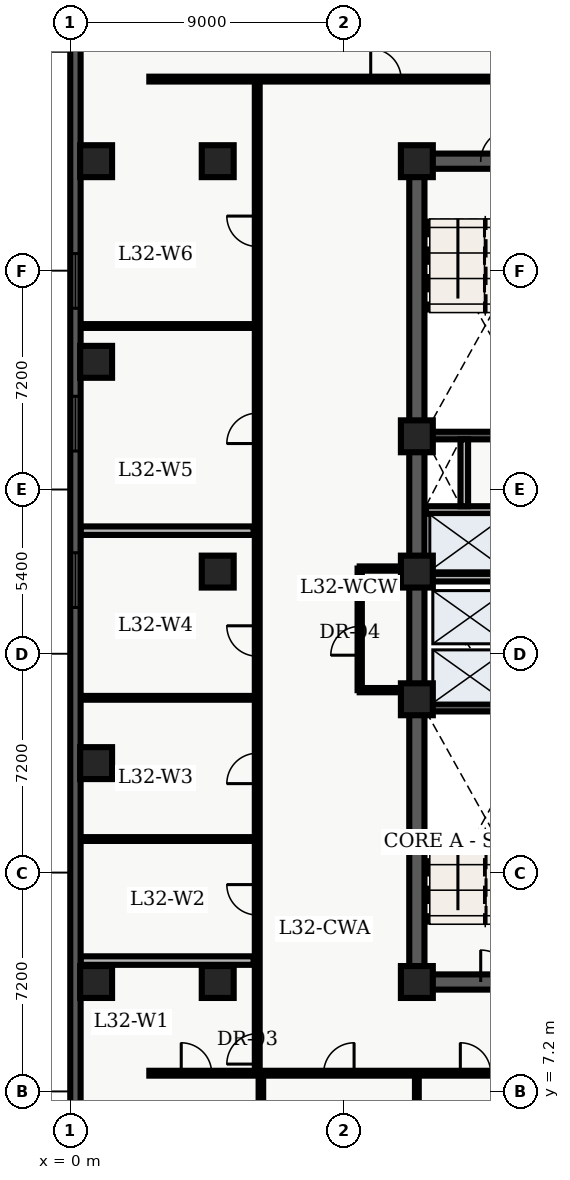
"""IFC4 building model, lengths in metres.
Left out: names, types, materials, properties, quantities, classifications, styles, units other than length and angle.
Written with IfcOpenShell. Run it as: python <this file> out.ifc"""

import sys

from ifc_helpers import new_model, entity, si_unit, converted_unit, direction, frame, origin_with_axes, origin_2d_with_axis, place, context, subcontext, project, spatial, polyline, rectangle, outline, extrude, element, fill, save


model = new_model("IFC4")
c1 = context("Model", 3, precision=1e-05, world=origin_with_axes(), true_north=direction((0.0, 1.0)))
c2 = subcontext(c1, "Body", "Model", "MODEL_VIEW")
j1 = project(units=[si_unit("LENGTHUNIT", "METRE"), converted_unit("PLANEANGLEUNIT", "DEGREE", entity("IfcPlaneAngleMeasure", 0.017), si_unit("PLANEANGLEUNIT", "RADIAN"), dimensions=[0, 0, 0, 0, 0, 0, 0])], contexts=[c1])
p1 = place(None, origin_with_axes())
s1 = spatial("IfcSite", under=j1, at=p1, CompositionType="ELEMENT")
p2 = place(p1, origin_with_axes())
s2 = spatial("IfcBuilding", under=s1, at=p2, CompositionType="ELEMENT")
p3 = place(p2, frame((0.0, 0.0, 132.9), z_axis=(0.0, 0.0, 1.0), x_axis=(1.0, 0.0, 0.0)))
s3 = spatial("IfcBuildingStorey", under=s2, at=p3, CompositionType="ELEMENT", Elevation=132.9)
p4 = place(p3, frame((11.4, 10.8, 0.0), z_axis=(0.0, 0.0, 1.0), x_axis=(0.0, 1.0, 0.0)))
e1 = element("IfcWall", 1, at=p4, inside=s3, PredefinedType="SHEAR", context=c2, shape_type="SweptSolid", body=[
    extrude(outline(polyline([(0.0, -0.25), (27.0, -0.25), (27.0, 0.25), (0.0, 0.25), (0.0, -0.25)])), origin_with_axes(), (0.0, 0.0, 1.0), 3.66),
])
p5 = place(p3, frame((11.4, 10.8, 0.0), z_axis=(0.0, 0.0, 1.0), x_axis=(1.0, 0.0, 0.0)))
e2 = element("IfcWall", 2, at=p5, inside=s3, PredefinedType="SHEAR", context=c2, shape_type="SweptSolid", body=[
    extrude(outline(polyline([(0.0, -0.25), (7.2, -0.25), (7.2, 0.25), (0.0, 0.25), (0.0, -0.25)])), origin_with_axes(), (0.0, 0.0, 1.0), 3.66),
])
p6 = place(p5, frame((2.625, 0.0, 0.0), z_axis=(0.0, 0.0, 1.0), x_axis=(1.0, 0.0, 0.0)))
e3 = element("IfcOpeningElement", 3, at=p6, cuts=e2, PredefinedType="OPENING", context=c2, shape_type="SweptSolid", body=[
    extrude(rectangle(XDim=1.05, YDim=0.52, at=origin_2d_with_axis()), origin_with_axes(), (0.0, 0.0, 1.0), 2.15),
])
p7 = place(p3, frame((11.4, 37.8, 0.0), z_axis=(0.0, 0.0, 1.0), x_axis=(1.0, 0.0, 0.0)))
e4 = element("IfcWall", 4, at=p7, inside=s3, PredefinedType="SHEAR", context=c2, shape_type="SweptSolid", body=[
    extrude(outline(polyline([(0.0, -0.25), (7.2, -0.25), (7.2, 0.25), (0.0, 0.25), (0.0, -0.25)])), origin_with_axes(), (0.0, 0.0, 1.0), 3.66),
])
p8 = place(p7, frame((2.625, 0.0, 0.0), z_axis=(0.0, 0.0, 1.0), x_axis=(1.0, 0.0, 0.0)))
e5 = element("IfcOpeningElement", 5, at=p8, cuts=e4, PredefinedType="OPENING", context=c2, shape_type="SweptSolid", body=[
    extrude(rectangle(XDim=1.05, YDim=0.52, at=origin_2d_with_axis()), origin_with_axes(), (0.0, 0.0, 1.0), 2.15),
])
for number, where, z_axis, x_axis in (
    (6, (11.65, 19.825, 0.0), (0.0, 0.0, 1.0), (1.0, 0.0, 0.0)),
    (7, (11.65, 28.775, 0.0), (0.0, 0.0, 1.0), (1.0, 0.0, 0.0)),
):
    element("IfcWall", number, at=place(p3, frame(where, z_axis=z_axis, x_axis=x_axis)), inside=s3, PredefinedType="SHEAR", context=c2, shape_type="SweptSolid", body=[
        extrude(outline(polyline([(0.0, -0.125), (6.7, -0.125), (6.7, 0.125), (0.0, 0.125), (0.0, -0.125)])), origin_with_axes(), (0.0, 0.0, 1.0), 3.66),
    ])
p9 = place(p3, frame((11.7, 24.1, 0.0), z_axis=(0.0, 0.0, 1.0), x_axis=(1.0, 0.0, 0.0)))
e8 = element("IfcWall", 8, at=p9, inside=s3, PredefinedType="SOLIDWALL", context=c2, shape_type="SweptSolid", body=[
    extrude(outline(polyline([(0.0, -0.125), (6.6, -0.125), (6.6, 0.125), (0.0, 0.125), (0.0, -0.125)])), origin_with_axes(), (0.0, 0.0, 1.0), 2.7),
])
p10 = place(p9, frame((3.75, 0.0, 0.0), z_axis=(0.0, 0.0, 1.0), x_axis=(1.0, 0.0, 0.0)))
e9 = element("IfcOpeningElement", 9, at=p10, cuts=e8, PredefinedType="OPENING", context=c2, shape_type="SweptSolid", body=[
    extrude(rectangle(XDim=0.9, YDim=0.27, at=origin_2d_with_axis()), origin_with_axes(), (0.0, 0.0, 1.0), 2.15),
])
p11 = place(p3, frame((11.7, 26.325, 0.0), z_axis=(0.0, 0.0, 1.0), x_axis=(1.0, 0.0, 0.0)))
e10 = element("IfcWall", 10, at=p11, inside=s3, PredefinedType="SOLIDWALL", context=c2, shape_type="SweptSolid", body=[
    extrude(outline(polyline([(0.0, -0.125), (6.6, -0.125), (6.6, 0.125), (0.0, 0.125), (0.0, -0.125)])), origin_with_axes(), (0.0, 0.0, 1.0), 2.7),
])
p12 = place(p11, frame((3.5, 0.0, 0.0), z_axis=(0.0, 0.0, 1.0), x_axis=(1.0, 0.0, 0.0)))
e11 = element("IfcOpeningElement", 11, at=p12, cuts=e10, PredefinedType="OPENING", context=c2, shape_type="SweptSolid", body=[
    extrude(rectangle(XDim=0.9, YDim=0.27, at=origin_2d_with_axis()), origin_with_axes(), (0.0, 0.0, 1.0), 2.15),
])
p13 = place(p3, frame((12.96, 26.45, 0.0), z_axis=(0.0, 0.0, 1.0), x_axis=(0.0, 1.0, 0.0)))
e12 = element("IfcWall", 12, at=p13, inside=s3, PredefinedType="SOLIDWALL", context=c2, shape_type="SweptSolid", body=[
    extrude(outline(polyline([(0.0, -0.125), (2.2, -0.125), (2.2, 0.125), (0.0, 0.125), (0.0, -0.125)])), origin_with_axes(), (0.0, 0.0, 1.0), 2.7),
])
for number, where, z_axis, x_axis in (
    (13, (11.4, 10.8, 0.0), (0.0, 0.0, 1.0), (1.0, 0.0, 0.0)),
    (14, (11.4, 20.1, 0.0), (0.0, 0.0, 1.0), (1.0, 0.0, 0.0)),
    (15, (11.4, 24.3, 0.0), (0.0, 0.0, 1.0), (1.0, 0.0, 0.0)),
    (16, (11.4, 28.75, 0.0), (0.0, 0.0, 1.0), (1.0, 0.0, 0.0)),
    (17, (11.4, 37.8, 0.0), (0.0, 0.0, 1.0), (1.0, 0.0, 0.0)),
    (18, (4.85, 10.8, 0.0), (0.0, 0.0, 1.0), (1.0, 0.0, 0.0)),
    (19, (4.85, 24.3, 0.0), (0.0, 0.0, 1.0), (1.0, 0.0, 0.0)),
    (20, (4.85, 37.8, 0.0), (0.0, 0.0, 1.0), (1.0, 0.0, 0.0)),
    (21, (0.85, 10.8, 0.0), (0.0, 0.0, 1.0), (1.0, 0.0, 0.0)),
    (22, (0.85, 18.0, 0.0), (0.0, 0.0, 1.0), (1.0, 0.0, 0.0)),
    (23, (0.85, 31.2, 0.0), (0.0, 0.0, 1.0), (1.0, 0.0, 0.0)),
    (24, (0.85, 37.8, 0.0), (0.0, 0.0, 1.0), (1.0, 0.0, 0.0)),
):
    element("IfcColumn", number, at=place(p3, frame(where, z_axis=z_axis, x_axis=x_axis)), inside=s3, PredefinedType="COLUMN", context=c2, shape_type="SweptSolid", body=[
        extrude(rectangle(XDim=1.05, YDim=1.05, at=origin_2d_with_axis()), origin_with_axes(), (0.0, 0.0, 1.0), 3.9),
    ])
p14 = place(p3, frame((9.52, 20.4, 0.0), z_axis=(0.0, 0.0, 1.0), x_axis=(0.0, 1.0, 0.0)))
e25 = element("IfcWall", 25, at=p14, inside=s3, PredefinedType="PARTITIONING", context=c2, shape_type="SweptSolid", body=[
    extrude(outline(polyline([(0.0, -0.07), (4.0, -0.07), (4.0, 0.07), (0.0, 0.07), (0.0, -0.07)])), origin_with_axes(), (0.0, 0.0, 1.0), 2.7),
])
p15 = place(p14, frame((1.625, 0.0, 0.0), z_axis=(0.0, 0.0, 1.0), x_axis=(1.0, 0.0, 0.0)))
e26 = element("IfcOpeningElement", 26, at=p15, cuts=e25, PredefinedType="OPENING", context=c2, shape_type="SweptSolid", body=[
    extrude(rectangle(XDim=0.95, YDim=0.16, at=origin_2d_with_axis()), origin_with_axes(), (0.0, 0.0, 1.0), 2.15),
])
for number, where, z_axis, x_axis in (
    (27, (9.52, 20.4, 0.0), (0.0, 0.0, 1.0), (1.0, 0.0, 0.0)),
    (28, (9.52, 24.4, 0.0), (0.0, 0.0, 1.0), (1.0, 0.0, 0.0)),
):
    element("IfcWall", number, at=place(p3, frame(where, z_axis=z_axis, x_axis=x_axis)), inside=s3, PredefinedType="PARTITIONING", context=c2, shape_type="SweptSolid", body=[
        extrude(outline(polyline([(0.0, -0.07), (1.58, -0.07), (1.58, 0.07), (0.0, 0.07), (0.0, -0.07)])), origin_with_axes(), (0.0, 0.0, 1.0), 2.7),
    ])
p16 = place(p3, frame((2.6, 7.8, 0.0), z_axis=(0.0, 0.0, 1.0), x_axis=(1.0, 0.0, 0.0)))
e29 = element("IfcWall", 29, at=p16, inside=s3, PredefinedType="PARTITIONING", context=c2, shape_type="SweptSolid", body=[
    extrude(outline(polyline([(0.0, -0.08), (18.55, -0.08), (18.55, 0.08), (0.0, 0.08), (0.0, -0.08)])), origin_with_axes(), (0.0, 0.0, 1.0), 2.7),
])
p17 = place(p16, frame((1.55, 0.0, 0.0), z_axis=(0.0, 0.0, 1.0), x_axis=(1.0, 0.0, 0.0)))
e30 = element("IfcOpeningElement", 30, at=p17, cuts=e29, PredefinedType="OPENING", context=c2, shape_type="SweptSolid", body=[
    extrude(rectangle(XDim=1.0, YDim=0.18, at=origin_2d_with_axis()), origin_with_axes(), (0.0, 0.0, 1.0), 2.15),
])
p18 = place(p16, frame((6.235, 0.0, 0.0), z_axis=(0.0, 0.0, 1.0), x_axis=(1.0, 0.0, 0.0)))
e31 = element("IfcOpeningElement", 31, at=p18, cuts=e29, PredefinedType="OPENING", context=c2, shape_type="SweptSolid", body=[
    extrude(rectangle(XDim=1.0, YDim=0.18, at=origin_2d_with_axis()), origin_with_axes(), (0.0, 0.0, 1.0), 2.15),
])
p19 = place(p16, frame((10.73, 0.0, 0.0), z_axis=(0.0, 0.0, 1.0), x_axis=(1.0, 0.0, 0.0)))
e32 = element("IfcOpeningElement", 32, at=p19, cuts=e29, PredefinedType="OPENING", context=c2, shape_type="SweptSolid", body=[
    extrude(rectangle(XDim=1.0, YDim=0.18, at=origin_2d_with_axis()), origin_with_axes(), (0.0, 0.0, 1.0), 2.15),
])
p20 = place(p16, frame((15.58, 0.0, 0.0), z_axis=(0.0, 0.0, 1.0), x_axis=(1.0, 0.0, 0.0)))
e33 = element("IfcOpeningElement", 33, at=p20, cuts=e29, PredefinedType="OPENING", context=c2, shape_type="SweptSolid", body=[
    extrude(rectangle(XDim=1.0, YDim=0.18, at=origin_2d_with_axis()), origin_with_axes(), (0.0, 0.0, 1.0), 2.15),
])
p21 = place(p3, frame((2.6, 40.5, 0.0), z_axis=(0.0, 0.0, 1.0), x_axis=(1.0, 0.0, 0.0)))
e34 = element("IfcWall", 34, at=p21, inside=s3, PredefinedType="PARTITIONING", context=c2, shape_type="SweptSolid", body=[
    extrude(outline(polyline([(0.0, -0.08), (18.769, -0.08), (18.769, 0.08), (0.0, 0.08), (0.0, -0.08)])), origin_with_axes(), (0.0, 0.0, 1.0), 2.7),
])
p22 = place(p21, frame((7.782, 0.0, 0.0), z_axis=(0.0, 0.0, 1.0), x_axis=(1.0, 0.0, 0.0)))
e35 = element("IfcOpeningElement", 35, at=p22, cuts=e34, PredefinedType="OPENING", context=c2, shape_type="SweptSolid", body=[
    extrude(rectangle(XDim=1.0, YDim=0.18, at=origin_2d_with_axis()), origin_with_axes(), (0.0, 0.0, 1.0), 2.15),
])
p23 = place(p3, frame((6.15, 7.8, 0.0), z_axis=(0.0, 0.0, 1.0), x_axis=(0.0, 1.0, 0.0)))
e36 = element("IfcWall", 36, at=p23, inside=s3, PredefinedType="PARTITIONING", context=c2, shape_type="SweptSolid", body=[
    extrude(outline(polyline([(0.0, -0.08), (32.7, -0.08), (32.7, 0.08), (0.0, 0.08), (0.0, -0.08)])), origin_with_axes(), (0.0, 0.0, 1.0), 2.7),
])
p24 = place(p23, frame((0.8, 0.0, 0.0), z_axis=(0.0, 0.0, 1.0), x_axis=(1.0, 0.0, 0.0)))
e37 = element("IfcOpeningElement", 37, at=p24, cuts=e36, PredefinedType="OPENING", context=c2, shape_type="SweptSolid", body=[
    extrude(rectangle(XDim=1.0, YDim=0.18, at=origin_2d_with_axis()), origin_with_axes(), (0.0, 0.0, 1.0), 2.15),
])
p25 = place(p23, frame((5.704, 0.0, 0.0), z_axis=(0.0, 0.0, 1.0), x_axis=(1.0, 0.0, 0.0)))
e38 = element("IfcOpeningElement", 38, at=p25, cuts=e36, PredefinedType="OPENING", context=c2, shape_type="SweptSolid", body=[
    extrude(rectangle(XDim=1.0, YDim=0.18, at=origin_2d_with_axis()), origin_with_axes(), (0.0, 0.0, 1.0), 2.15),
])
p26 = place(p23, frame((10.025, 0.0, 0.0), z_axis=(0.0, 0.0, 1.0), x_axis=(1.0, 0.0, 0.0)))
e39 = element("IfcOpeningElement", 39, at=p26, cuts=e36, PredefinedType="OPENING", context=c2, shape_type="SweptSolid", body=[
    extrude(rectangle(XDim=1.0, YDim=0.18, at=origin_2d_with_axis()), origin_with_axes(), (0.0, 0.0, 1.0), 2.15),
])
p27 = place(p23, frame((14.217, 0.0, 0.0), z_axis=(0.0, 0.0, 1.0), x_axis=(1.0, 0.0, 0.0)))
e40 = element("IfcOpeningElement", 40, at=p27, cuts=e36, PredefinedType="OPENING", context=c2, shape_type="SweptSolid", body=[
    extrude(rectangle(XDim=1.0, YDim=0.18, at=origin_2d_with_axis()), origin_with_axes(), (0.0, 0.0, 1.0), 2.15),
])
p28 = place(p23, frame((21.212, 0.0, 0.0), z_axis=(0.0, 0.0, 1.0), x_axis=(1.0, 0.0, 0.0)))
e41 = element("IfcOpeningElement", 41, at=p28, cuts=e36, PredefinedType="OPENING", context=c2, shape_type="SweptSolid", body=[
    extrude(rectangle(XDim=1.0, YDim=0.18, at=origin_2d_with_axis()), origin_with_axes(), (0.0, 0.0, 1.0), 2.15),
])
p29 = place(p23, frame((27.694, 0.0, 0.0), z_axis=(0.0, 0.0, 1.0), x_axis=(1.0, 0.0, 0.0)))
e42 = element("IfcOpeningElement", 42, at=p29, cuts=e36, PredefinedType="OPENING", context=c2, shape_type="SweptSolid", body=[
    extrude(rectangle(XDim=1.0, YDim=0.18, at=origin_2d_with_axis()), origin_with_axes(), (0.0, 0.0, 1.0), 2.15),
])
p30 = place(p3, frame((0.335, 11.505, 0.0), z_axis=(0.0, 0.0, 1.0), x_axis=(1.0, 0.0, 0.0)))
e43 = element("IfcWall", 43, at=p30, inside=s3, PredefinedType="PARTITIONING", context=c2, shape_type="SweptSolid", body=[
    extrude(outline(polyline([(0.0, -0.14), (5.695, -0.14), (5.695, 0.14), (0.0, 0.14), (0.0, -0.14)])), origin_with_axes(), (0.0, 0.0, 1.0), 2.7),
])
for number, where, z_axis, x_axis in (
    (44, (0.335, 15.503, 0.0), (0.0, 0.0, 1.0), (1.0, 0.0, 0.0)),
    (45, (0.335, 20.148, 0.0), (0.0, 0.0, 1.0), (1.0, 0.0, 0.0)),
):
    element("IfcWall", number, at=place(p3, frame(where, z_axis=z_axis, x_axis=x_axis)), inside=s3, PredefinedType="PARTITIONING", context=c2, shape_type="SweptSolid", body=[
        extrude(outline(polyline([(0.0, -0.062), (5.695, -0.062), (5.695, 0.062), (0.0, 0.062), (0.0, -0.062)])), origin_with_axes(), (0.0, 0.0, 1.0), 2.7),
    ])
p31 = place(p3, frame((0.335, 25.646, 0.0), z_axis=(0.0, 0.0, 1.0), x_axis=(1.0, 0.0, 0.0)))
e46 = element("IfcWall", 46, at=p31, inside=s3, PredefinedType="PARTITIONING", context=c2, shape_type="SweptSolid", body=[
    extrude(outline(polyline([(0.0, -0.14), (5.695, -0.14), (5.695, 0.14), (0.0, 0.14), (0.0, -0.14)])), origin_with_axes(), (0.0, 0.0, 1.0), 2.7),
])
p32 = place(p3, frame((0.335, 32.378, 0.0), z_axis=(0.0, 0.0, 1.0), x_axis=(1.0, 0.0, 0.0)))
e47 = element("IfcWall", 47, at=p32, inside=s3, PredefinedType="PARTITIONING", context=c2, shape_type="SweptSolid", body=[
    extrude(outline(polyline([(0.0, -0.062), (5.695, -0.062), (5.695, 0.062), (0.0, 0.062), (0.0, -0.062)])), origin_with_axes(), (0.0, 0.0, 1.0), 2.7),
])
p33 = place(p3, frame((6.27, 0.335, 0.0), z_axis=(0.0, 0.0, 1.0), x_axis=(0.0, 1.0, 0.0)))
e48 = element("IfcWall", 48, at=p33, inside=s3, PredefinedType="PARTITIONING", context=c2, shape_type="SweptSolid", body=[
    extrude(outline(polyline([(0.0, -0.075), (7.365, -0.075), (7.365, 0.075), (0.0, 0.075), (0.0, -0.075)])), origin_with_axes(), (0.0, 0.0, 1.0), 2.7),
])
p34 = place(p3, frame((11.4, 0.335, 0.0), z_axis=(0.0, 0.0, 1.0), x_axis=(0.0, 1.0, 0.0)))
e49 = element("IfcWall", 49, at=p34, inside=s3, PredefinedType="PARTITIONING", context=c2, shape_type="SweptSolid", body=[
    extrude(outline(polyline([(0.0, -0.062), (7.365, -0.062), (7.365, 0.062), (0.0, 0.062), (0.0, -0.062)])), origin_with_axes(), (0.0, 0.0, 1.0), 2.7),
])
p35 = place(p3, frame((0.17, 2.74, 0.0), z_axis=(0.0, 0.0, 1.0), x_axis=(0.0, 1.0, 0.0)))
e50 = element("IfcWall", 50, at=p35, inside=s3, PredefinedType="SOLIDWALL", context=c2, shape_type="SweptSolid", body=[
    extrude(outline(polyline([(0.0, -0.17), (43.46, -0.17), (43.46, 0.17), (0.0, 0.17), (0.0, -0.17)])), origin_with_axes(), (0.0, 0.0, 1.0), 3.66),
])
p36 = place(p35, frame((2.948, 0.0, 0.45), z_axis=(0.0, 0.0, 1.0), x_axis=(1.0, 0.0, 0.0)))
e51 = element("IfcOpeningElement", 51, at=p36, cuts=e50, PredefinedType="OPENING", context=c2, shape_type="SweptSolid", body=[
    extrude(rectangle(XDim=1.8, YDim=0.36, at=origin_2d_with_axis()), origin_with_axes(), (0.0, 0.0, 1.0), 2.1),
])
p37 = place(p35, frame((21.28, 0.0, 0.45), z_axis=(0.0, 0.0, 1.0), x_axis=(1.0, 0.0, 0.0)))
e52 = element("IfcOpeningElement", 52, at=p37, cuts=e50, PredefinedType="OPENING", context=c2, shape_type="SweptSolid", body=[
    extrude(rectangle(XDim=1.8, YDim=0.36, at=origin_2d_with_axis()), origin_with_axes(), (0.0, 0.0, 1.0), 2.1),
])
p38 = place(p35, frame((26.426, 0.0, 0.45), z_axis=(0.0, 0.0, 1.0), x_axis=(1.0, 0.0, 0.0)))
e53 = element("IfcOpeningElement", 53, at=p38, cuts=e50, PredefinedType="OPENING", context=c2, shape_type="SweptSolid", body=[
    extrude(rectangle(XDim=1.8, YDim=0.36, at=origin_2d_with_axis()), origin_with_axes(), (0.0, 0.0, 1.0), 2.1),
])
p39 = place(p35, frame((31.121, 0.0, 0.45), z_axis=(0.0, 0.0, 1.0), x_axis=(1.0, 0.0, 0.0)))
e54 = element("IfcOpeningElement", 54, at=p39, cuts=e50, PredefinedType="OPENING", context=c2, shape_type="SweptSolid", body=[
    extrude(rectangle(XDim=1.8, YDim=0.36, at=origin_2d_with_axis()), origin_with_axes(), (0.0, 0.0, 1.0), 2.1),
])
p40 = place(p35, frame((40.062, 0.0, 0.45), z_axis=(0.0, 0.0, 1.0), x_axis=(1.0, 0.0, 0.0)))
e55 = element("IfcOpeningElement", 55, at=p40, cuts=e50, PredefinedType="OPENING", context=c2, shape_type="SweptSolid", body=[
    extrude(rectangle(XDim=1.8, YDim=0.36, at=origin_2d_with_axis()), origin_with_axes(), (0.0, 0.0, 1.0), 2.1),
])
p41 = place(p5, frame((2.625, 0.0, 0.0), z_axis=(0.0, 0.0, 1.0), x_axis=(1.0, 0.0, 0.0)))
e56 = element("IfcDoor", 56, at=p41, inside=s3, OperationType="SINGLE_SWING_LEFT", PredefinedType="DOOR", context=c2, shape_type="SweptSolid", body=[
    extrude(rectangle(XDim=1.05, YDim=0.09, at=origin_2d_with_axis()), origin_with_axes(), (0.0, 0.0, 1.0), 2.15),
])
fill(e3, e56)
p42 = place(p7, frame((2.625, 0.0, 0.0), z_axis=(0.0, 0.0, 1.0), x_axis=(1.0, 0.0, 0.0)))
e57 = element("IfcDoor", 57, at=p42, inside=s3, OperationType="SINGLE_SWING_RIGHT", PredefinedType="DOOR", context=c2, shape_type="SweptSolid", body=[
    extrude(rectangle(XDim=1.05, YDim=0.09, at=origin_2d_with_axis()), origin_with_axes(), (0.0, 0.0, 1.0), 2.15),
])
fill(e5, e57)
p43 = place(p14, frame((1.625, 0.0, 0.0), z_axis=(0.0, 0.0, 1.0), x_axis=(1.0, 0.0, 0.0)))
e58 = element("IfcDoor", 58, at=p43, inside=s3, OperationType="SINGLE_SWING_LEFT", PredefinedType="DOOR", context=c2, shape_type="SweptSolid", body=[
    extrude(rectangle(XDim=0.95, YDim=0.084, at=origin_2d_with_axis()), origin_with_axes(), (0.0, 0.0, 1.0), 2.15),
])
fill(e26, e58)
p44 = place(p23, frame((0.8, 0.0, 0.0), z_axis=(0.0, 0.0, 1.0), x_axis=(1.0, 0.0, 0.0)))
e59 = element("IfcDoor", 59, at=p44, inside=s3, OperationType="SINGLE_SWING_LEFT", PredefinedType="DOOR", context=c2, shape_type="SweptSolid", body=[
    extrude(rectangle(XDim=1.0, YDim=0.09, at=origin_2d_with_axis()), origin_with_axes(), (0.0, 0.0, 1.0), 2.15),
])
fill(e37, e59)
p45 = place(p23, frame((5.704, 0.0, 0.0), z_axis=(0.0, 0.0, 1.0), x_axis=(1.0, 0.0, 0.0)))
e60 = element("IfcDoor", 60, at=p45, inside=s3, OperationType="SINGLE_SWING_RIGHT", PredefinedType="DOOR", context=c2, shape_type="SweptSolid", body=[
    extrude(rectangle(XDim=1.0, YDim=0.09, at=origin_2d_with_axis()), origin_with_axes(), (0.0, 0.0, 1.0), 2.15),
])
fill(e38, e60)
p46 = place(p23, frame((10.025, 0.0, 0.0), z_axis=(0.0, 0.0, 1.0), x_axis=(1.0, 0.0, 0.0)))
e61 = element("IfcDoor", 61, at=p46, inside=s3, OperationType="SINGLE_SWING_LEFT", PredefinedType="DOOR", context=c2, shape_type="SweptSolid", body=[
    extrude(rectangle(XDim=1.0, YDim=0.09, at=origin_2d_with_axis()), origin_with_axes(), (0.0, 0.0, 1.0), 2.15),
])
fill(e39, e61)
p47 = place(p23, frame((14.217, 0.0, 0.0), z_axis=(0.0, 0.0, 1.0), x_axis=(1.0, 0.0, 0.0)))
e62 = element("IfcDoor", 62, at=p47, inside=s3, OperationType="SINGLE_SWING_RIGHT", PredefinedType="DOOR", context=c2, shape_type="SweptSolid", body=[
    extrude(rectangle(XDim=1.0, YDim=0.09, at=origin_2d_with_axis()), origin_with_axes(), (0.0, 0.0, 1.0), 2.15),
])
fill(e40, e62)
p48 = place(p23, frame((21.212, 0.0, 0.0), z_axis=(0.0, 0.0, 1.0), x_axis=(1.0, 0.0, 0.0)))
e63 = element("IfcDoor", 63, at=p48, inside=s3, OperationType="SINGLE_SWING_LEFT", PredefinedType="DOOR", context=c2, shape_type="SweptSolid", body=[
    extrude(rectangle(XDim=1.0, YDim=0.09, at=origin_2d_with_axis()), origin_with_axes(), (0.0, 0.0, 1.0), 2.15),
])
fill(e41, e63)
p49 = place(p23, frame((27.694, 0.0, 0.0), z_axis=(0.0, 0.0, 1.0), x_axis=(1.0, 0.0, 0.0)))
e64 = element("IfcDoor", 64, at=p49, inside=s3, OperationType="SINGLE_SWING_RIGHT", PredefinedType="DOOR", context=c2, shape_type="SweptSolid", body=[
    extrude(rectangle(XDim=1.0, YDim=0.09, at=origin_2d_with_axis()), origin_with_axes(), (0.0, 0.0, 1.0), 2.15),
])
fill(e42, e64)
p50 = place(p16, frame((1.55, 0.0, 0.0), z_axis=(0.0, 0.0, 1.0), x_axis=(1.0, 0.0, 0.0)))
e65 = element("IfcDoor", 65, at=p50, inside=s3, OperationType="SINGLE_SWING_LEFT", PredefinedType="DOOR", context=c2, shape_type="SweptSolid", body=[
    extrude(rectangle(XDim=1.0, YDim=0.09, at=origin_2d_with_axis()), origin_with_axes(), (0.0, 0.0, 1.0), 2.15),
])
fill(e30, e65)
p51 = place(p16, frame((6.235, 0.0, 0.0), z_axis=(0.0, 0.0, 1.0), x_axis=(1.0, 0.0, 0.0)))
e66 = element("IfcDoor", 66, at=p51, inside=s3, OperationType="SINGLE_SWING_RIGHT", PredefinedType="DOOR", context=c2, shape_type="SweptSolid", body=[
    extrude(rectangle(XDim=1.0, YDim=0.09, at=origin_2d_with_axis()), origin_with_axes(), (0.0, 0.0, 1.0), 2.15),
])
fill(e31, e66)
p52 = place(p16, frame((10.73, 0.0, 0.0), z_axis=(0.0, 0.0, 1.0), x_axis=(1.0, 0.0, 0.0)))
e67 = element("IfcDoor", 67, at=p52, inside=s3, OperationType="SINGLE_SWING_LEFT", PredefinedType="DOOR", context=c2, shape_type="SweptSolid", body=[
    extrude(rectangle(XDim=1.0, YDim=0.09, at=origin_2d_with_axis()), origin_with_axes(), (0.0, 0.0, 1.0), 2.15),
])
fill(e32, e67)
p53 = place(p21, frame((7.782, 0.0, 0.0), z_axis=(0.0, 0.0, 1.0), x_axis=(1.0, 0.0, 0.0)))
e68 = element("IfcDoor", 68, at=p53, inside=s3, OperationType="SINGLE_SWING_LEFT", PredefinedType="DOOR", context=c2, shape_type="SweptSolid", body=[
    extrude(rectangle(XDim=1.0, YDim=0.09, at=origin_2d_with_axis()), origin_with_axes(), (0.0, 0.0, 1.0), 2.15),
])
fill(e35, e68)
p54 = place(p35, frame((21.28, 0.0, 0.45), z_axis=(0.0, 0.0, 1.0), x_axis=(1.0, 0.0, 0.0)))
e69 = element("IfcWindow", 69, at=p54, inside=s3, PredefinedType="WINDOW", context=c2, shape_type="SweptSolid", body=[
    extrude(rectangle(XDim=1.8, YDim=0.09, at=origin_2d_with_axis()), origin_with_axes(), (0.0, 0.0, 1.0), 2.1),
])
fill(e52, e69)
p55 = place(p35, frame((26.426, 0.0, 0.45), z_axis=(0.0, 0.0, 1.0), x_axis=(1.0, 0.0, 0.0)))
e70 = element("IfcWindow", 70, at=p55, inside=s3, PredefinedType="WINDOW", context=c2, shape_type="SweptSolid", body=[
    extrude(rectangle(XDim=1.8, YDim=0.09, at=origin_2d_with_axis()), origin_with_axes(), (0.0, 0.0, 1.0), 2.1),
])
fill(e53, e70)
p56 = place(p35, frame((31.121, 0.0, 0.45), z_axis=(0.0, 0.0, 1.0), x_axis=(1.0, 0.0, 0.0)))
e71 = element("IfcWindow", 71, at=p56, inside=s3, PredefinedType="WINDOW", context=c2, shape_type="SweptSolid", body=[
    extrude(rectangle(XDim=1.8, YDim=0.09, at=origin_2d_with_axis()), origin_with_axes(), (0.0, 0.0, 1.0), 2.1),
])
fill(e54, e71)
save(model, sys.argv[1])
